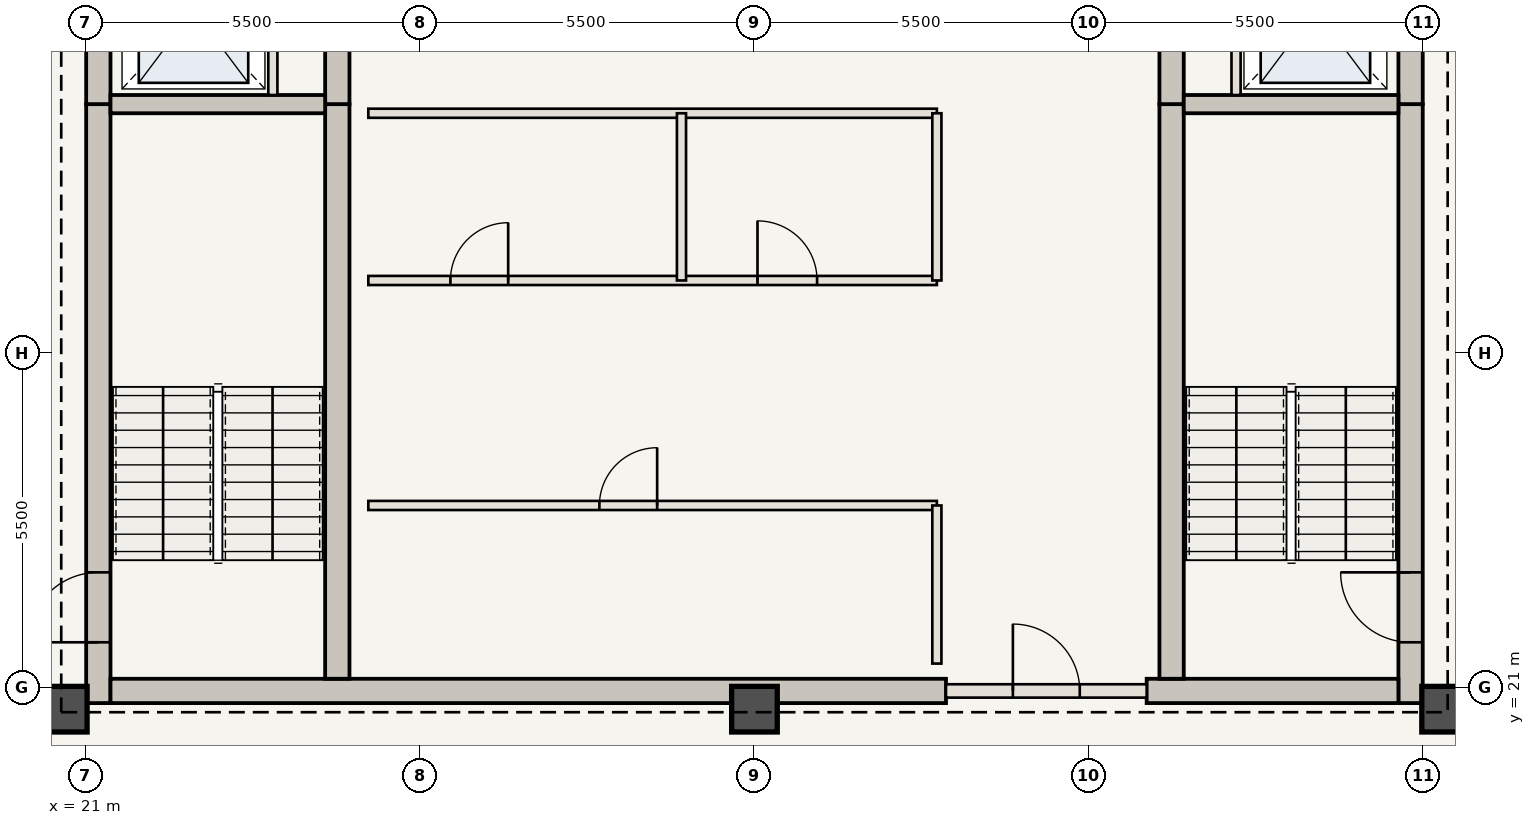
"""IFC4 building model, lengths in metres.
Left out: names, types, materials, properties, quantities, classifications, styles, units other than length and angle.
Written with IfcOpenShell. Run it as: python <this file> out.ifc"""

import sys

from ifc_helpers import new_model, si_unit, direction, frame, frame_2d, origin, origin_2d, place, context, subcontext, project, spatial, rectangle, extrude, element, fill, save


model = new_model("IFC4")
c1 = context("Model", 3, precision=1e-05, world=origin(), true_north=direction((0.0, 1.0)))
c2 = subcontext(c1, "Body", "Model", "MODEL_VIEW")
j1 = project(units=[si_unit("LENGTHUNIT", "METRE"), si_unit("PLANEANGLEUNIT", "RADIAN")], contexts=[c1])
p1 = place(None, origin())
s1 = spatial("IfcSite", under=j1, at=p1, CompositionType="ELEMENT")
p2 = place(p1, origin())
s2 = spatial("IfcBuilding", under=s1, at=p2, CompositionType="ELEMENT")
p3 = place(p2, frame((0.0, 0.0, 281.4)))
s3 = spatial("IfcBuildingStorey", under=s2, at=p3, CompositionType="ELEMENT", Elevation=281.4)
p4 = place(p3, frame((21.21, 20.75, 0.0), z_axis=(0.0, 0.0, 1.0), x_axis=(0.0, 1.0, 0.0)))
e1 = element("IfcWall", 1, at=p4, inside=s3, PredefinedType="SHEAR", context=c2, shape_type="SweptSolid", body=[
    extrude(rectangle(XDim=9.85, YDim=0.4, at=frame_2d((4.925, 0.0))), origin(), (0.0, 0.0, 1.0), 3.85),
])
p5 = place(p4, frame((1.0, 0.0, 0.0)))
e2 = element("IfcOpeningElement", 2, at=p5, cuts=e1, PredefinedType="OPENING", context=c2, shape_type="SweptSolid", body=[
    extrude(rectangle(XDim=1.15, YDim=2.15, at=frame_2d((0.575, 1.075))), frame((0.0, 0.21, 0.0), z_axis=(0.0, -1.0, 0.0), x_axis=(1.0, 0.0, 0.0)), (0.0, 0.0, 1.0), 0.42),
])
p6 = place(p3, frame((21.21, 30.6, 0.0), z_axis=(0.0, 0.0, 1.0), x_axis=(0.0, 1.0, 0.0)))
e3 = element("IfcWall", 3, at=p6, inside=s3, PredefinedType="SHEAR", context=c2, shape_type="SweptSolid", body=[
    extrude(rectangle(XDim=12.6, YDim=0.4, at=frame_2d((6.3, 0.0))), origin(), (0.0, 0.0, 1.0), 3.85),
])
p7 = place(p6, frame((4.2, 0.0, 0.0)))
e4 = element("IfcOpeningElement", 4, at=p7, cuts=e3, PredefinedType="OPENING", context=c2, shape_type="SweptSolid", body=[
    extrude(rectangle(XDim=1.1, YDim=2.15, at=frame_2d((0.55, 1.075))), frame((0.0, 0.21, 0.0), z_axis=(0.0, -1.0, 0.0), x_axis=(1.0, 0.0, 0.0)), (0.0, 0.0, 1.0), 0.42),
])
p8 = place(p6, frame((9.2, 0.0, 0.0)))
e5 = element("IfcOpeningElement", 5, at=p8, cuts=e3, PredefinedType="OPENING", context=c2, shape_type="SweptSolid", body=[
    extrude(rectangle(XDim=0.92, YDim=2.1, at=frame_2d((0.46, 1.05))), frame((0.0, 0.21, 0.0), z_axis=(0.0, -1.0, 0.0), x_axis=(1.0, 0.0, 0.0)), (0.0, 0.0, 1.0), 0.42),
])
p9 = place(p3, frame((42.79, 20.75, 0.0), z_axis=(0.0, 0.0, 1.0), x_axis=(0.0, 1.0, 0.0)))
e6 = element("IfcWall", 6, at=p9, inside=s3, PredefinedType="SHEAR", context=c2, shape_type="SweptSolid", body=[
    extrude(rectangle(XDim=9.85, YDim=0.4, at=frame_2d((4.925, 0.0))), origin(), (0.0, 0.0, 1.0), 3.85),
])
p10 = place(p9, frame((1.0, 0.0, 0.0)))
e7 = element("IfcOpeningElement", 7, at=p10, cuts=e6, PredefinedType="OPENING", context=c2, shape_type="SweptSolid", body=[
    extrude(rectangle(XDim=1.15, YDim=2.15, at=frame_2d((0.575, 1.075))), frame((0.0, 0.21, 0.0), z_axis=(0.0, -1.0, 0.0), x_axis=(1.0, 0.0, 0.0)), (0.0, 0.0, 1.0), 0.42),
])
p11 = place(p3, frame((42.79, 30.6, 0.0), z_axis=(0.0, 0.0, 1.0), x_axis=(0.0, 1.0, 0.0)))
e8 = element("IfcWall", 8, at=p11, inside=s3, PredefinedType="SHEAR", context=c2, shape_type="SweptSolid", body=[
    extrude(rectangle(XDim=12.6, YDim=0.4, at=frame_2d((6.3, 0.0))), origin(), (0.0, 0.0, 1.0), 3.85),
])
p12 = place(p11, frame((4.2, 0.0, 0.0)))
e9 = element("IfcOpeningElement", 9, at=p12, cuts=e8, PredefinedType="OPENING", context=c2, shape_type="SweptSolid", body=[
    extrude(rectangle(XDim=1.1, YDim=2.15, at=frame_2d((0.55, 1.075))), frame((0.0, 0.21, 0.0), z_axis=(0.0, -1.0, 0.0), x_axis=(1.0, 0.0, 0.0)), (0.0, 0.0, 1.0), 0.42),
])
p13 = place(p11, frame((8.05, 0.0, 0.0)))
e10 = element("IfcOpeningElement", 10, at=p13, cuts=e8, PredefinedType="OPENING", context=c2, shape_type="SweptSolid", body=[
    extrude(rectangle(XDim=0.88, YDim=2.1, at=frame_2d((0.44, 1.05))), frame((0.0, 0.21, 0.0), z_axis=(0.0, -1.0, 0.0), x_axis=(1.0, 0.0, 0.0)), (0.0, 0.0, 1.0), 0.42),
])
p14 = place(p11, frame((9.45, 0.0, 0.0)))
e11 = element("IfcOpeningElement", 11, at=p14, cuts=e8, PredefinedType="OPENING", context=c2, shape_type="SweptSolid", body=[
    extrude(rectangle(XDim=0.88, YDim=2.1, at=frame_2d((0.44, 1.05))), frame((0.0, 0.21, 0.0), z_axis=(0.0, -1.0, 0.0), x_axis=(1.0, 0.0, 0.0)), (0.0, 0.0, 1.0), 0.42),
])
p15 = place(p11, frame((10.85, 0.0, 0.0)))
e12 = element("IfcOpeningElement", 12, at=p15, cuts=e8, PredefinedType="OPENING", context=c2, shape_type="SweptSolid", body=[
    extrude(rectangle(XDim=0.88, YDim=2.1, at=frame_2d((0.44, 1.05))), frame((0.0, 0.21, 0.0), z_axis=(0.0, -1.0, 0.0), x_axis=(1.0, 0.0, 0.0)), (0.0, 0.0, 1.0), 0.42),
])
p16 = place(p3, frame((21.41, 20.95, 0.0), z_axis=(0.0, 0.0, 1.0), x_axis=(1.0, 0.0, 0.0)))
e13 = element("IfcWall", 13, at=p16, inside=s3, PredefinedType="SHEAR", context=c2, shape_type="SweptSolid", body=[
    extrude(rectangle(XDim=13.74, YDim=0.4, at=frame_2d((6.87, 0.0))), origin(), (0.0, 0.0, 1.0), 3.85),
])
p17 = place(p3, frame((38.45, 20.95, 0.0), z_axis=(0.0, 0.0, 1.0), x_axis=(1.0, 0.0, 0.0)))
e14 = element("IfcWall", 14, at=p17, inside=s3, PredefinedType="SHEAR", context=c2, shape_type="SweptSolid", body=[
    extrude(rectangle(XDim=4.14, YDim=0.4, at=frame_2d((2.07, 0.0))), origin(), (0.0, 0.0, 1.0), 3.85),
])
p18 = place(p3, frame((25.14, 21.15, 0.0), z_axis=(0.0, 0.0, 1.0), x_axis=(0.0, 1.0, 0.0)))
e15 = element("IfcWall", 15, at=p18, inside=s3, PredefinedType="SHEAR", context=c2, shape_type="SweptSolid", body=[
    extrude(rectangle(XDim=9.45, YDim=0.4, at=frame_2d((4.725, 0.0))), origin(), (0.0, 0.0, 1.0), 3.85),
])
p19 = place(p3, frame((25.14, 30.6, 0.0), z_axis=(0.0, 0.0, 1.0), x_axis=(0.0, 1.0, 0.0)))
e16 = element("IfcWall", 16, at=p19, inside=s3, PredefinedType="SHEAR", context=c2, shape_type="SweptSolid", body=[
    extrude(rectangle(XDim=12.2, YDim=0.4, at=frame_2d((6.1, 0.0))), origin(), (0.0, 0.0, 1.0), 3.85),
])
p20 = place(p19, frame((6.25, 0.0, 0.0)))
e17 = element("IfcOpeningElement", 17, at=p20, cuts=e16, PredefinedType="OPENING", context=c2, shape_type="SweptSolid", body=[
    extrude(rectangle(XDim=1.1, YDim=2.15, at=frame_2d((0.55, 1.075))), frame((0.0, 0.21, 0.0), z_axis=(0.0, -1.0, 0.0), x_axis=(1.0, 0.0, 0.0)), (0.0, 0.0, 1.0), 0.42),
])
p21 = place(p3, frame((38.86, 21.15, 0.0), z_axis=(0.0, 0.0, 1.0), x_axis=(0.0, 1.0, 0.0)))
e18 = element("IfcWall", 18, at=p21, inside=s3, PredefinedType="SHEAR", context=c2, shape_type="SweptSolid", body=[
    extrude(rectangle(XDim=9.45, YDim=0.4, at=frame_2d((4.725, 0.0))), origin(), (0.0, 0.0, 1.0), 3.85),
])
p22 = place(p3, frame((38.86, 30.6, 0.0), z_axis=(0.0, 0.0, 1.0), x_axis=(0.0, 1.0, 0.0)))
e19 = element("IfcWall", 19, at=p22, inside=s3, PredefinedType="SHEAR", context=c2, shape_type="SweptSolid", body=[
    extrude(rectangle(XDim=12.2, YDim=0.4, at=frame_2d((6.1, 0.0))), origin(), (0.0, 0.0, 1.0), 3.85),
])
for number, where, z_axis, x_axis in (
    (20, (20.65, 20.65, 0.0), (0.0, 0.0, 1.0), (1.0, 0.0, 0.0)),
    (21, (32.0, 20.65, 0.0), (0.0, 0.0, 1.0), (1.0, 0.0, 0.0)),
    (22, (43.35, 20.65, 0.0), (0.0, 0.0, 1.0), (1.0, 0.0, 0.0)),
):
    element("IfcColumn", number, at=place(p3, frame(where, z_axis=z_axis, x_axis=x_axis)), inside=s3, PredefinedType="COLUMN", context=c2, shape_type="SweptSolid", body=[
        extrude(rectangle(XDim=0.75, YDim=0.75, at=origin_2d()), origin(), (0.0, 0.0, 1.0), 3.85),
    ])
for number, where, z_axis, x_axis in (
    (23, (21.41, 30.6, 0.0), (0.0, 0.0, 1.0), (1.0, 0.0, 0.0)),
    (24, (39.06, 30.6, 0.0), (0.0, 0.0, 1.0), (1.0, 0.0, 0.0)),
):
    element("IfcWall", number, at=place(p3, frame(where, z_axis=z_axis, x_axis=x_axis)), inside=s3, PredefinedType="SHEAR", context=c2, shape_type="SweptSolid", body=[
        extrude(rectangle(XDim=3.53, YDim=0.3, at=frame_2d((1.765, 0.0))), origin(), (0.0, 0.0, 1.0), 3.685),
    ])
for number, where, z_axis, x_axis in (
    (25, (24.08, 30.75, 0.0), (0.0, 0.0, 1.0), (0.0, 1.0, 0.0)),
    (26, (39.92, 30.75, 0.0), (0.0, 0.0, 1.0), (0.0, 1.0, 0.0)),
):
    element("IfcWall", number, at=place(p3, frame(where, z_axis=z_axis, x_axis=x_axis)), inside=s3, PredefinedType="STANDARD", context=c2, shape_type="SweptSolid", body=[
        extrude(rectangle(XDim=2.65, YDim=0.15, at=frame_2d((1.325, 0.0))), origin(), (0.0, 0.0, 1.0), 3.685),
    ])
p23 = place(p3, frame((35.15, 20.95, 0.0), z_axis=(0.0, 0.0, 1.0), x_axis=(1.0, 0.0, 0.0)))
e27 = element("IfcWall", 27, at=p23, inside=s3, PredefinedType="STANDARD", context=c2, shape_type="SweptSolid", body=[
    extrude(rectangle(XDim=3.3, YDim=0.22, at=frame_2d((1.65, 0.0))), origin(), (0.0, 0.0, 1.0), 3.685),
])
p24 = place(p23, frame((1.1, 0.0, 0.0)))
e28 = element("IfcOpeningElement", 28, at=p24, cuts=e27, PredefinedType="OPENING", context=c2, shape_type="SweptSolid", body=[
    extrude(rectangle(XDim=1.1, YDim=2.15, at=frame_2d((0.55, 1.075))), frame((0.0, 0.12, 0.0), z_axis=(0.0, -1.0, 0.0), x_axis=(1.0, 0.0, 0.0)), (0.0, 0.0, 1.0), 0.24),
])
p25 = place(p3, frame((25.65, 24.0, 0.0), z_axis=(0.0, 0.0, 1.0), x_axis=(1.0, 0.0, 0.0)))
e29 = element("IfcWall", 29, at=p25, inside=s3, PredefinedType="STANDARD", context=c2, shape_type="SweptSolid", body=[
    extrude(rectangle(XDim=9.35, YDim=0.15, at=frame_2d((4.675, 0.0))), origin(), (0.0, 0.0, 1.0), 3.685),
])
p26 = place(p25, frame((3.8, 0.0, 0.0)))
e30 = element("IfcOpeningElement", 30, at=p26, cuts=e29, PredefinedType="OPENING", context=c2, shape_type="SweptSolid", body=[
    extrude(rectangle(XDim=0.95, YDim=2.15, at=frame_2d((0.475, 1.075))), frame((0.0, 0.085, 0.0), z_axis=(0.0, -1.0, 0.0), x_axis=(1.0, 0.0, 0.0)), (0.0, 0.0, 1.0), 0.17),
])
p27 = place(p3, frame((35.0, 21.4, 0.0), z_axis=(0.0, 0.0, 1.0), x_axis=(0.0, 1.0, 0.0)))
e31 = element("IfcWall", 31, at=p27, inside=s3, PredefinedType="STANDARD", context=c2, shape_type="SweptSolid", body=[
    extrude(rectangle(XDim=2.6, YDim=0.15, at=frame_2d((1.3, 0.0))), origin(), (0.0, 0.0, 1.0), 3.685),
])
p28 = place(p3, frame((25.65, 27.7, 0.0), z_axis=(0.0, 0.0, 1.0), x_axis=(1.0, 0.0, 0.0)))
e32 = element("IfcWall", 32, at=p28, inside=s3, PredefinedType="STANDARD", context=c2, shape_type="SweptSolid", body=[
    extrude(rectangle(XDim=9.35, YDim=0.15, at=frame_2d((4.675, 0.0))), origin(), (0.0, 0.0, 1.0), 3.685),
])
p29 = place(p28, frame((1.35, 0.0, 0.0)))
e33 = element("IfcOpeningElement", 33, at=p29, cuts=e32, PredefinedType="OPENING", context=c2, shape_type="SweptSolid", body=[
    extrude(rectangle(XDim=0.95, YDim=2.15, at=frame_2d((0.475, 1.075))), frame((0.0, 0.085, 0.0), z_axis=(0.0, -1.0, 0.0), x_axis=(1.0, 0.0, 0.0)), (0.0, 0.0, 1.0), 0.17),
])
p30 = place(p28, frame((6.4, 0.0, 0.0)))
e34 = element("IfcOpeningElement", 34, at=p30, cuts=e32, PredefinedType="OPENING", context=c2, shape_type="SweptSolid", body=[
    extrude(rectangle(XDim=0.98, YDim=2.2, at=frame_2d((0.49, 1.1))), frame((0.0, 0.085, 0.0), z_axis=(0.0, -1.0, 0.0), x_axis=(1.0, 0.0, 0.0)), (0.0, 0.0, 1.0), 0.17),
])
p31 = place(p3, frame((25.65, 30.45, 0.0), z_axis=(0.0, 0.0, 1.0), x_axis=(1.0, 0.0, 0.0)))
e35 = element("IfcWall", 35, at=p31, inside=s3, PredefinedType="STANDARD", context=c2, shape_type="SweptSolid", body=[
    extrude(rectangle(XDim=9.35, YDim=0.15, at=frame_2d((4.675, 0.0))), origin(), (0.0, 0.0, 1.0), 3.685),
])
for number, where, z_axis, x_axis in (
    (36, (30.8, 27.7, 0.0), (0.0, 0.0, 1.0), (0.0, 1.0, 0.0)),
    (37, (35.0, 27.7, 0.0), (0.0, 0.0, 1.0), (0.0, 1.0, 0.0)),
):
    element("IfcWall", number, at=place(p3, frame(where, z_axis=z_axis, x_axis=x_axis)), inside=s3, PredefinedType="STANDARD", context=c2, shape_type="SweptSolid", body=[
        extrude(rectangle(XDim=2.75, YDim=0.15, at=frame_2d((1.375, 0.0))), origin(), (0.0, 0.0, 1.0), 3.685),
    ])
p32 = place(p5, origin())
e38 = element("IfcDoor", 38, at=p32, inside=s3, OperationType="SINGLE_SWING_LEFT", PredefinedType="DOOR", context=c2, shape_type="SweptSolid", body=[
    extrude(rectangle(XDim=1.15, YDim=2.15, at=frame_2d((0.575, 1.075))), frame((0.0, 0.025, 0.0), z_axis=(0.0, -1.0, 0.0), x_axis=(1.0, 0.0, 0.0)), (0.0, 0.0, 1.0), 0.05),
])
fill(e2, e38)
p33 = place(p10, origin())
e39 = element("IfcDoor", 39, at=p33, inside=s3, OperationType="SINGLE_SWING_RIGHT", PredefinedType="DOOR", context=c2, shape_type="SweptSolid", body=[
    extrude(rectangle(XDim=1.15, YDim=2.15, at=frame_2d((0.575, 1.075))), frame((0.0, 0.025, 0.0), z_axis=(0.0, -1.0, 0.0), x_axis=(1.0, 0.0, 0.0)), (0.0, 0.0, 1.0), 0.05),
])
fill(e7, e39)
p34 = place(p24, origin())
e40 = element("IfcDoor", 40, at=p34, inside=s3, OperationType="SINGLE_SWING_LEFT", PredefinedType="DOOR", context=c2, shape_type="SweptSolid", body=[
    extrude(rectangle(XDim=1.1, YDim=2.15, at=frame_2d((0.55, 1.075))), frame((0.0, 0.025, 0.0), z_axis=(0.0, -1.0, 0.0), x_axis=(1.0, 0.0, 0.0)), (0.0, 0.0, 1.0), 0.05),
])
fill(e28, e40)
p35 = place(p26, origin())
e41 = element("IfcDoor", 41, at=p35, inside=s3, OperationType="SINGLE_SWING_RIGHT", PredefinedType="DOOR", context=c2, shape_type="SweptSolid", body=[
    extrude(rectangle(XDim=0.95, YDim=2.15, at=frame_2d((0.475, 1.075))), frame((0.0, 0.025, 0.0), z_axis=(0.0, -1.0, 0.0), x_axis=(1.0, 0.0, 0.0)), (0.0, 0.0, 1.0), 0.05),
])
fill(e30, e41)
p36 = place(p29, origin())
e42 = element("IfcDoor", 42, at=p36, inside=s3, OperationType="SINGLE_SWING_RIGHT", PredefinedType="DOOR", context=c2, shape_type="SweptSolid", body=[
    extrude(rectangle(XDim=0.95, YDim=2.15, at=frame_2d((0.475, 1.075))), frame((0.0, 0.025, 0.0), z_axis=(0.0, -1.0, 0.0), x_axis=(1.0, 0.0, 0.0)), (0.0, 0.0, 1.0), 0.05),
])
fill(e33, e42)
p37 = place(p30, origin())
e43 = element("IfcDoor", 43, at=p37, inside=s3, OperationType="SINGLE_SWING_LEFT", PredefinedType="DOOR", context=c2, shape_type="SweptSolid", body=[
    extrude(rectangle(XDim=0.98, YDim=2.2, at=frame_2d((0.49, 1.1))), frame((0.0, 0.025, 0.0), z_axis=(0.0, -1.0, 0.0), x_axis=(1.0, 0.0, 0.0)), (0.0, 0.0, 1.0), 0.05),
])
fill(e34, e43)
save(model, sys.argv[1])
